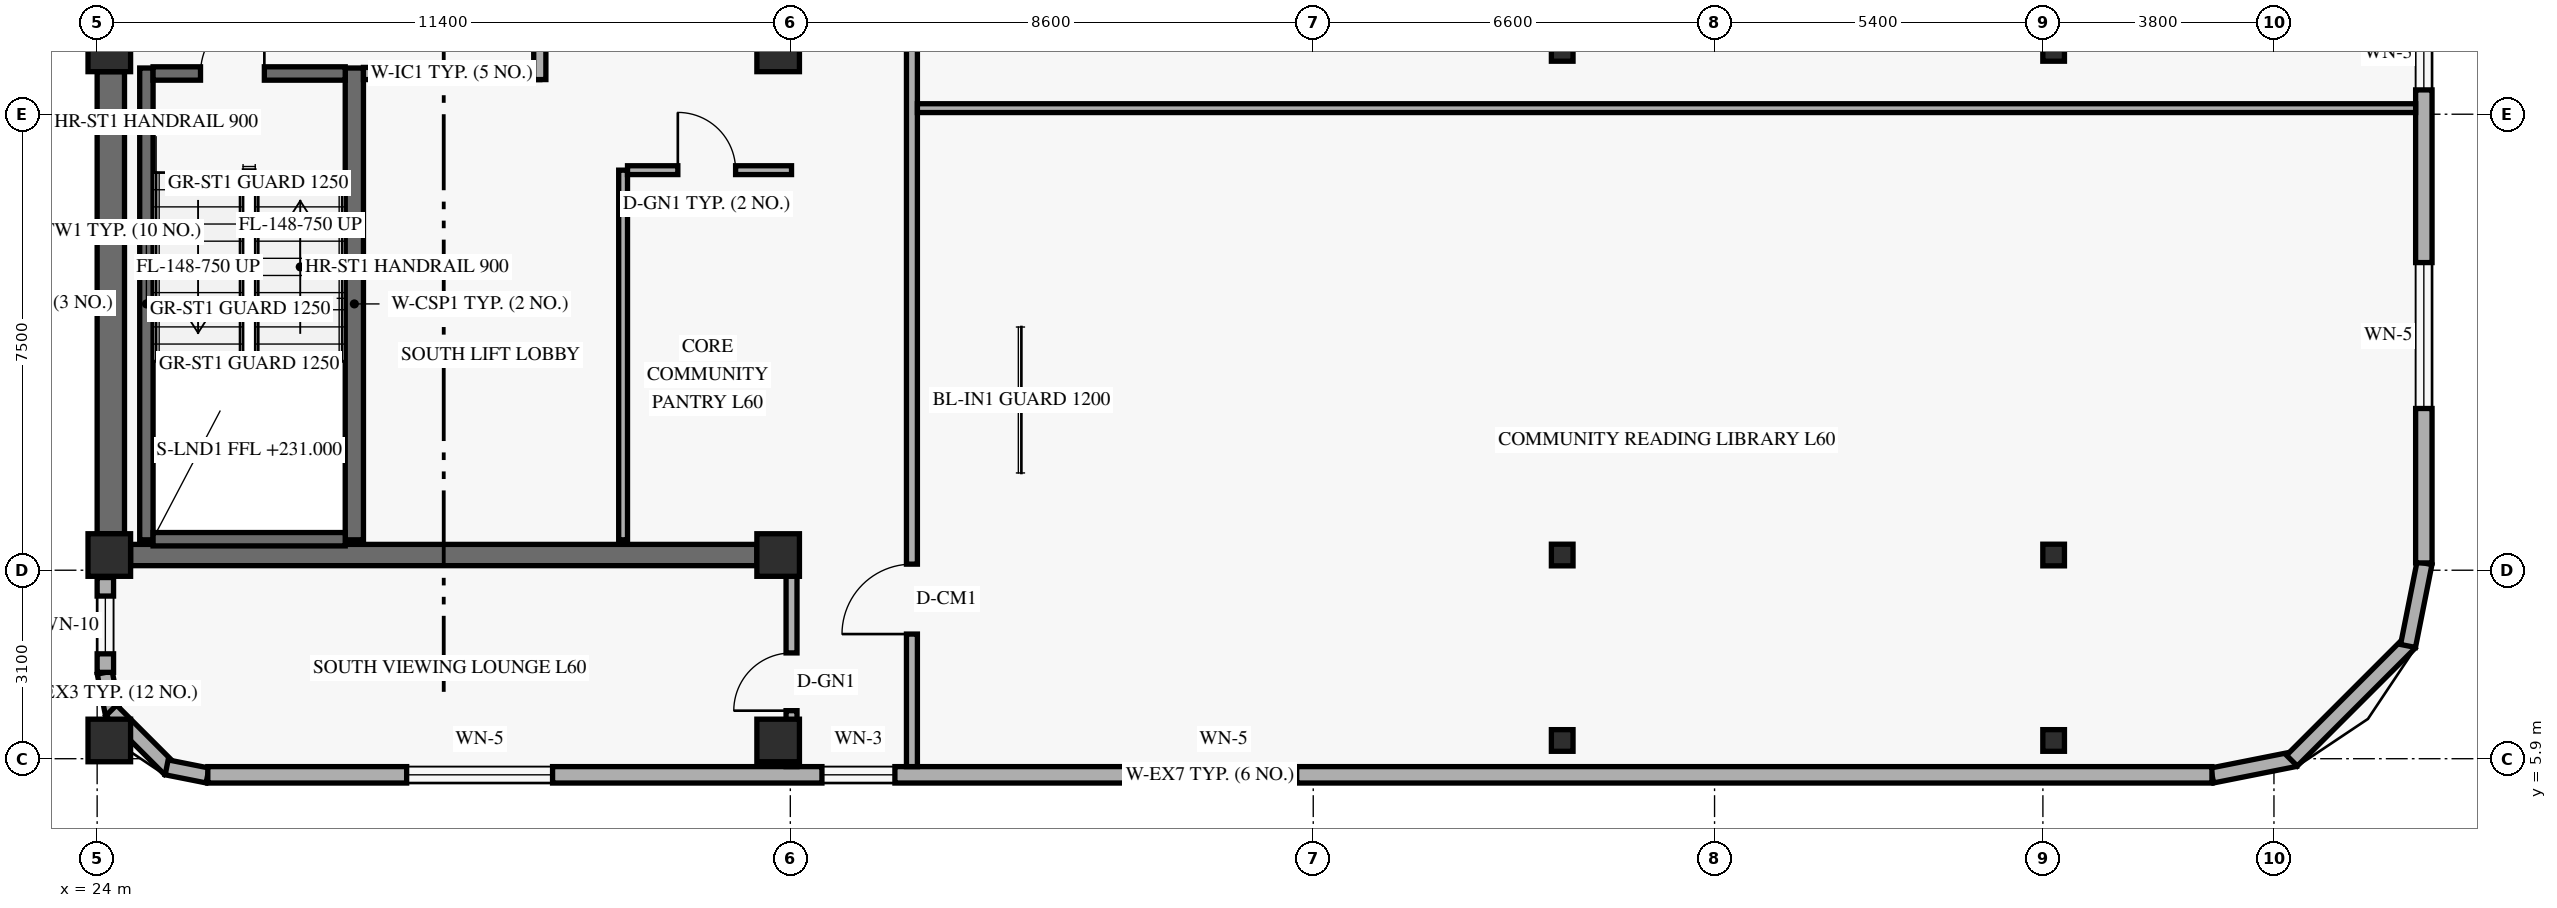
"""IFC4 building model, lengths in metres.
Left out: names, types, materials, properties, quantities, classifications, styles, units other than length and angle.
Written with IfcOpenShell. Run it as: python <this file> out.ifc"""

import sys

from ifc_helpers import new_model, si_unit, direction, frame, frame_2d, origin, origin_2d, place, context, subcontext, project, spatial, rectangle, hollow_rectangle, extrude, element, fill, save


model = new_model("IFC4")
c1 = context("Model", 3, precision=1e-05, world=origin(), true_north=direction((0.0, 1.0)))
c2 = subcontext(c1, "Body", "Model", "MODEL_VIEW")
j1 = project(units=[si_unit("LENGTHUNIT", "METRE"), si_unit("PLANEANGLEUNIT", "RADIAN")], contexts=[c1])
p1 = place(None, origin())
s1 = spatial("IfcSite", under=j1, at=p1, CompositionType="ELEMENT")
p2 = place(p1, origin())
s2 = spatial("IfcBuilding", under=s1, at=p2, CompositionType="ELEMENT")
p3 = place(p2, frame((0.0, 0.0, 231.0)))
s3 = spatial("IfcBuildingStorey", under=s2, at=p3, CompositionType="ELEMENT", Elevation=231.0)
p4 = place(p3, frame((24.225, 9.6, 0.0), z_axis=(0.0, 0.0, 1.0), x_axis=(0.0, 1.0, 0.0)))
e1 = element("IfcWall", 1, at=p4, inside=s3, PredefinedType="SHEAR", context=c2, shape_type="SweptSolid", body=[
    extrude(rectangle(XDim=7.6, YDim=0.45, at=frame_2d((3.8, 0.0))), origin(), (0.0, 0.0, 1.0), 3.421),
])
p5 = place(p3, frame((24.55, 9.25, 0.0), z_axis=(0.0, 0.0, 1.0), x_axis=(1.0, 0.0, 0.0)))
e2 = element("IfcWall", 2, at=p5, inside=s3, PredefinedType="SHEAR", context=c2, shape_type="SweptSolid", body=[
    extrude(rectangle(XDim=10.3, YDim=0.35, at=frame_2d((5.15, 0.0))), origin(), (0.0, 0.0, 1.0), 3.96),
])
p6 = place(p3, frame((24.81, 9.5, 0.0), z_axis=(0.0, 0.0, 1.0), x_axis=(0.0, 1.0, 0.0)))
e3 = element("IfcWall", 3, at=p6, inside=s3, PredefinedType="SHEAR", context=c2, shape_type="SweptSolid", body=[
    extrude(rectangle(XDim=7.76, YDim=0.22, at=frame_2d((3.88, 0.0))), origin(), (0.0, 0.0, 1.0), 3.96),
])
p7 = place(p3, frame((28.23, 9.5, 0.0), z_axis=(0.0, 0.0, 1.0), x_axis=(0.0, 1.0, 0.0)))
e4 = element("IfcWall", 4, at=p7, inside=s3, PredefinedType="SHEAR", context=c2, shape_type="SweptSolid", body=[
    extrude(rectangle(XDim=7.76, YDim=0.3, at=frame_2d((3.88, 0.0))), origin(), (0.0, 0.0, 1.0), 3.96),
])
p8 = place(p3, frame((24.92, 9.51, 0.0), z_axis=(0.0, 0.0, 1.0), x_axis=(1.0, 0.0, 0.0)))
e5 = element("IfcWall", 5, at=p8, inside=s3, PredefinedType="SHEAR", context=c2, shape_type="SweptSolid", body=[
    extrude(rectangle(XDim=3.16, YDim=0.22, at=frame_2d((1.58, 0.0))), origin(), (0.0, 0.0, 1.0), 3.96),
])
p9 = place(p3, frame((24.92, 17.17, 0.0), z_axis=(0.0, 0.0, 1.0), x_axis=(1.0, 0.0, 0.0)))
e6 = element("IfcWall", 6, at=p9, inside=s3, PredefinedType="SHEAR", context=c2, shape_type="SweptSolid", body=[
    extrude(rectangle(XDim=3.16, YDim=0.22, at=frame_2d((1.58, 0.0))), origin(), (0.0, 0.0, 1.0), 3.96),
])
p10 = place(p9, frame((0.78, 0.0, 0.0)))
e7 = element("IfcOpeningElement", 7, at=p10, cuts=e6, PredefinedType="OPENING", context=c2, shape_type="SweptSolid", body=[
    extrude(rectangle(XDim=1.05, YDim=2.15, at=frame_2d((0.525, 1.075))), frame((0.0, 0.12, 0.0), z_axis=(0.0, -1.0, 0.0), x_axis=(1.0, 0.0, 0.0)), (0.0, 0.0, 1.0), 0.24),
])
for number, where, z_axis, x_axis in (
    (8, (24.2, 6.2, 0.0), (0.0, 0.0, 1.0), (1.0, 0.0, 0.0)),
    (9, (24.2, 9.25, 0.0), (0.0, 0.0, 1.0), (1.0, 0.0, 0.0)),
    (10, (24.2, 17.55, 0.0), (0.0, 0.0, 1.0), (1.0, 0.0, 0.0)),
    (11, (35.2, 6.2, 0.0), (0.0, 0.0, 1.0), (1.0, 0.0, 0.0)),
    (12, (35.2, 9.25, 0.0), (0.0, 0.0, 1.0), (1.0, 0.0, 0.0)),
    (13, (35.2, 17.55, 0.0), (0.0, 0.0, 1.0), (1.0, 0.0, 0.0)),
):
    element("IfcColumn", number, at=place(p3, frame(where, z_axis=z_axis, x_axis=x_axis)), inside=s3, PredefinedType="COLUMN", context=c2, shape_type="SweptSolid", body=[
        extrude(rectangle(XDim=0.7, YDim=0.7, at=origin_2d()), origin(), (0.0, 0.0, 1.0), 4.2),
    ])
for number, where, z_axis, x_axis in (
    (14, (48.021, 6.2, 0.0), (0.035, 0.0, 0.999), (0.0, 1.0, 0.0)),
    (15, (48.021, 9.25, 0.0), (0.035, 0.0, 0.999), (0.0, 1.0, 0.0)),
    (16, (48.021, 17.55, 0.0), (0.035, 0.0, 0.999), (0.0, 1.0, 0.0)),
):
    element("IfcColumn", number, at=place(p3, frame(where, z_axis=z_axis, x_axis=x_axis)), inside=s3, PredefinedType="COLUMN", context=c2, shape_type="SweptSolid", body=[
        extrude(hollow_rectangle(XDim=0.356, YDim=0.356, WallThickness=0.016, at=origin_2d()), origin(), (0.0, 0.0, 1.0), 4.203),
    ])
for number, where, z_axis, x_axis in (
    (17, (56.055, 6.2, 0.0), (0.058, 0.0, 0.998), (0.0, 1.0, 0.0)),
    (18, (56.055, 9.25, 0.0), (0.058, 0.0, 0.998), (0.0, 1.0, 0.0)),
    (19, (56.055, 17.55, 0.0), (0.058, 0.0, 0.998), (0.0, 1.0, 0.0)),
):
    element("IfcColumn", number, at=place(p3, frame(where, z_axis=z_axis, x_axis=x_axis)), inside=s3, PredefinedType="COLUMN", context=c2, shape_type="SweptSolid", body=[
        extrude(hollow_rectangle(XDim=0.356, YDim=0.356, WallThickness=0.016, at=origin_2d()), origin(), (0.0, 0.0, 1.0), 4.207),
    ])
p11 = place(p3, frame((24.124, 7.316, 0.0), z_axis=(0.0, 0.0, 1.0), x_axis=(0.194952956674, -0.980812594069, 0.0)))
e20 = element("IfcWall", 20, at=p11, inside=s3, PredefinedType="SOLIDWALL", context=c2, shape_type="SweptSolid", body=[
    extrude(rectangle(XDim=0.686, YDim=0.25, at=frame_2d((0.343, 0.0))), origin(), (0.0, 0.0, 1.0), 3.403),
])
p12 = place(p3, frame((24.231, 6.694, 0.0), z_axis=(0.0, 0.0, 1.0), x_axis=(0.707106781187, -0.707106781187, 0.0)))
e21 = element("IfcWall", 21, at=p12, inside=s3, PredefinedType="SOLIDWALL", context=c2, shape_type="SweptSolid", body=[
    extrude(rectangle(XDim=1.362, YDim=0.25, at=frame_2d((0.681, 0.0))), origin(), (0.0, 0.0, 1.0), 3.403),
])
p13 = place(p3, frame((25.143, 5.758, 0.0), z_axis=(0.0, 0.0, 1.0), x_axis=(0.980812594069, -0.194952956674, 0.0)))
e22 = element("IfcWall", 22, at=p13, inside=s3, PredefinedType="SOLIDWALL", context=c2, shape_type="SweptSolid", body=[
    extrude(rectangle(XDim=0.686, YDim=0.25, at=frame_2d((0.343, 0.0))), origin(), (0.0, 0.0, 1.0), 3.96),
])
p14 = place(p3, frame((58.783, 5.624, 0.0), z_axis=(0.0, 0.0, 1.0), x_axis=(0.980809899341, 0.19496651342, 0.0)))
e23 = element("IfcWall", 23, at=p14, inside=s3, PredefinedType="SOLIDWALL", context=c2, shape_type="SweptSolid", body=[
    extrude(rectangle(XDim=1.389, YDim=0.25, at=frame_2d((0.694, 0.0))), origin(), (0.0, 0.0, 1.0), 3.96),
])
p15 = place(p3, frame((60.095, 5.868, 0.0), z_axis=(0.0, 0.0, 1.0), x_axis=(0.707106781187, 0.707106781187, 0.0)))
e24 = element("IfcWall", 24, at=p15, inside=s3, PredefinedType="SOLIDWALL", context=c2, shape_type="SweptSolid", body=[
    extrude(rectangle(XDim=2.739, YDim=0.25, at=frame_2d((1.37, 0.0))), origin(), (0.0, 0.0, 1.0), 3.96),
])
p16 = place(p3, frame((62.005, 7.754, 0.0), z_axis=(0.0, 0.0, 1.0), x_axis=(0.195135625965, 0.9807762678, 0.0)))
e25 = element("IfcWall", 25, at=p16, inside=s3, PredefinedType="SOLIDWALL", context=c2, shape_type="SweptSolid", body=[
    extrude(rectangle(XDim=1.389, YDim=0.25, at=frame_2d((0.694, 0.0))), origin(), (0.0, 0.0, 1.0), 3.96),
])
p17 = place(p3, frame((25.82, 5.635, 0.0), z_axis=(0.0, 0.0, 1.0), x_axis=(1.0, 0.0, 0.0)))
e26 = element("IfcWall", 26, at=p17, inside=s3, PredefinedType="SOLIDWALL", context=c2, shape_type="SweptSolid", body=[
    extrude(rectangle(XDim=32.96, YDim=0.27, at=frame_2d((16.48, 0.0))), origin(), (0.0, 0.0, 1.0), 3.96),
])
p18 = place(p17, frame((3.27, 0.0, 0.85)))
e27 = element("IfcOpeningElement", 27, at=p18, cuts=e26, PredefinedType="OPENING", context=c2, shape_type="SweptSolid", body=[
    extrude(rectangle(XDim=2.4, YDim=1.9, at=frame_2d((1.2, 0.95))), frame((0.0, 0.145, 0.0), z_axis=(0.0, -1.0, 0.0), x_axis=(1.0, 0.0, 0.0)), (0.0, 0.0, 1.0), 0.29),
])
p19 = place(p17, frame((10.1, 0.0, 0.85)))
e28 = element("IfcOpeningElement", 28, at=p19, cuts=e26, PredefinedType="OPENING", context=c2, shape_type="SweptSolid", body=[
    extrude(rectangle(XDim=1.2, YDim=1.5, at=frame_2d((0.6, 0.75))), frame((0.0, 0.145, 0.0), z_axis=(0.0, -1.0, 0.0), x_axis=(1.0, 0.0, 0.0)), (0.0, 0.0, 1.0), 0.29),
])
p20 = place(p17, frame((15.507, 0.0, 0.85)))
e29 = element("IfcOpeningElement", 29, at=p20, cuts=e26, PredefinedType="OPENING", context=c2, shape_type="SweptSolid", body=[
    extrude(rectangle(XDim=2.4, YDim=1.9, at=frame_2d((1.2, 0.95))), frame((0.0, 0.145, 0.0), z_axis=(0.0, -1.0, 0.0), x_axis=(1.0, 0.0, 0.0)), (0.0, 0.0, 1.0), 0.29),
])
p21 = place(p3, frame((62.265, 9.12, 0.0), z_axis=(0.0, 0.0, 1.0), x_axis=(0.0, 1.0, 0.0)))
e30 = element("IfcWall", 30, at=p21, inside=s3, PredefinedType="SOLIDWALL", context=c2, shape_type="SweptSolid", body=[
    extrude(rectangle(XDim=9.28, YDim=0.27, at=frame_2d((4.64, 0.0))), origin(), (0.0, 0.0, 1.0), 3.96),
])
p22 = place(p21, frame((2.54, 0.0, 0.85)))
e31 = element("IfcOpeningElement", 31, at=p22, cuts=e30, PredefinedType="OPENING", context=c2, shape_type="SweptSolid", body=[
    extrude(rectangle(XDim=2.4, YDim=1.9, at=frame_2d((1.2, 0.95))), frame((0.0, 0.145, 0.0), z_axis=(0.0, -1.0, 0.0), x_axis=(1.0, 0.0, 0.0)), (0.0, 0.0, 1.0), 0.29),
])
p23 = place(p21, frame((7.78, 0.0, 0.85)))
e32 = element("IfcOpeningElement", 32, at=p23, cuts=e30, PredefinedType="OPENING", context=c2, shape_type="SweptSolid", body=[
    extrude(rectangle(XDim=1.2, YDim=1.5, at=frame_2d((0.6, 0.75))), frame((0.0, 0.145, 0.0), z_axis=(0.0, -1.0, 0.0), x_axis=(1.0, 0.0, 0.0)), (0.0, 0.0, 1.0), 0.29),
])
p24 = place(p3, frame((24.135, 7.32, 0.0), z_axis=(0.0, 0.0, 1.0), x_axis=(0.0, 1.0, 0.0)))
e33 = element("IfcWall", 33, at=p24, inside=s3, PredefinedType="SOLIDWALL", context=c2, shape_type="SweptSolid", body=[
    extrude(rectangle(XDim=1.56, YDim=0.27, at=frame_2d((0.78, 0.0))), origin(), (0.0, 0.0, 1.0), 3.403),
])
p25 = place(p24, frame((0.305, 0.0, 0.85)))
e34 = element("IfcOpeningElement", 34, at=p25, cuts=e33, PredefinedType="OPENING", context=c2, shape_type="SweptSolid", body=[
    extrude(rectangle(XDim=0.95, YDim=1.5, at=frame_2d((0.475, 0.75))), frame((0.0, 0.145, 0.0), z_axis=(0.0, -1.0, 0.0), x_axis=(1.0, 0.0, 0.0)), (0.0, 0.0, 1.0), 0.29),
])
p26 = place(p3, frame((28.38, 17.17, 0.0), z_axis=(0.0, 0.0, 1.0), x_axis=(1.0, 0.0, 0.0)))
e35 = element("IfcWall", 35, at=p26, inside=s3, PredefinedType="STANDARD", context=c2, shape_type="SweptSolid", body=[
    extrude(rectangle(XDim=2.9, YDim=0.2, at=frame_2d((1.45, 0.0))), origin(), (0.0, 0.0, 1.0), 3.96),
])
p27 = place(p3, frame((31.28, 17.07, 0.0), z_axis=(0.0, 0.0, 1.0), x_axis=(0.0, 1.0, 0.0)))
e36 = element("IfcWall", 36, at=p27, inside=s3, PredefinedType="STANDARD", context=c2, shape_type="SweptSolid", body=[
    extrude(rectangle(XDim=3.92, YDim=0.2, at=frame_2d((1.96, 0.0))), origin(), (0.0, 0.0, 1.0), 3.403),
])
p28 = place(p27, frame((1.35, 0.0, 0.0)))
e37 = element("IfcOpeningElement", 37, at=p28, cuts=e36, PredefinedType="OPENING", context=c2, shape_type="SweptSolid", body=[
    extrude(rectangle(XDim=1.2, YDim=2.15, at=frame_2d((0.6, 1.075))), frame((0.0, 0.11, 0.0), z_axis=(0.0, -1.0, 0.0), x_axis=(1.0, 0.0, 0.0)), (0.0, 0.0, 1.0), 0.22),
])
p29 = place(p3, frame((37.4, 5.77, 0.0), z_axis=(0.0, 0.0, 1.0), x_axis=(0.0, 1.0, 0.0)))
e38 = element("IfcWall", 38, at=p29, inside=s3, PredefinedType="STANDARD", context=c2, shape_type="SweptSolid", body=[
    extrude(rectangle(XDim=36.46, YDim=0.18, at=frame_2d((18.23, 0.0))), origin(), (0.0, 0.0, 1.0), 3.403),
])
p30 = place(p29, frame((26.32, 0.0, 0.0)))
e39 = element("IfcOpeningElement", 39, at=p30, cuts=e38, PredefinedType="OPENING", context=c2, shape_type="SweptSolid", body=[
    extrude(rectangle(XDim=0.92, YDim=2.14, at=frame_2d((0.46, 1.07))), frame((0.0, 0.1, 0.0), z_axis=(0.0, -1.0, 0.0), x_axis=(1.0, 0.0, 0.0)), (0.0, 0.0, 1.0), 0.2),
])
p31 = place(p29, frame((31.95, 0.0, 0.0)))
e40 = element("IfcOpeningElement", 40, at=p31, cuts=e38, PredefinedType="OPENING", context=c2, shape_type="SweptSolid", body=[
    extrude(rectangle(XDim=0.95, YDim=2.14, at=frame_2d((0.475, 1.07))), frame((0.0, 0.1, 0.0), z_axis=(0.0, -1.0, 0.0), x_axis=(1.0, 0.0, 0.0)), (0.0, 0.0, 1.0), 0.2),
])
p32 = place(p29, frame((2.18, 0.0, 0.0)))
e41 = element("IfcOpeningElement", 41, at=p32, cuts=e38, PredefinedType="OPENING", context=c2, shape_type="SweptSolid", body=[
    extrude(rectangle(XDim=1.15, YDim=2.15, at=frame_2d((0.575, 1.075))), frame((0.0, 0.1, 0.0), z_axis=(0.0, -1.0, 0.0), x_axis=(1.0, 0.0, 0.0)), (0.0, 0.0, 1.0), 0.2),
])
p33 = place(p29, frame((22.63, 0.0, 0.0)))
e42 = element("IfcOpeningElement", 42, at=p33, cuts=e38, PredefinedType="OPENING", context=c2, shape_type="SweptSolid", body=[
    extrude(rectangle(XDim=1.15, YDim=2.15, at=frame_2d((0.575, 1.075))), frame((0.0, 0.1, 0.0), z_axis=(0.0, -1.0, 0.0), x_axis=(1.0, 0.0, 0.0)), (0.0, 0.0, 1.0), 0.2),
])
p34 = place(p3, frame((35.42, 5.77, 0.0), z_axis=(0.0, 0.0, 1.0), x_axis=(0.0, 1.0, 0.0)))
e43 = element("IfcWall", 43, at=p34, inside=s3, PredefinedType="STANDARD", context=c2, shape_type="SweptSolid", body=[
    extrude(rectangle(XDim=3.48, YDim=0.18, at=frame_2d((1.74, 0.0))), origin(), (0.0, 0.0, 1.0), 3.403),
])
p35 = place(p34, frame((0.92, 0.0, 0.0)))
e44 = element("IfcOpeningElement", 44, at=p35, cuts=e43, PredefinedType="OPENING", context=c2, shape_type="SweptSolid", body=[
    extrude(rectangle(XDim=0.95, YDim=2.15, at=frame_2d((0.475, 1.075))), frame((0.0, 0.1, 0.0), z_axis=(0.0, -1.0, 0.0), x_axis=(1.0, 0.0, 0.0)), (0.0, 0.0, 1.0), 0.2),
])
p36 = place(p3, frame((37.49, 16.6, 0.0), z_axis=(0.0, 0.0, 1.0), x_axis=(1.0, 0.0, 0.0)))
e45 = element("IfcWall", 45, at=p36, inside=s3, PredefinedType="PARTITIONING", context=c2, shape_type="SweptSolid", body=[
    extrude(rectangle(XDim=24.64, YDim=0.145, at=frame_2d((12.32, 0.0))), origin(), (0.0, 0.0, 1.0), 3.403),
])
p37 = place(p3, frame((32.65, 9.5, 0.0), z_axis=(0.0, 0.0, 1.0), x_axis=(0.0, 1.0, 0.0)))
e46 = element("IfcWall", 46, at=p37, inside=s3, PredefinedType="PARTITIONING", context=c2, shape_type="SweptSolid", body=[
    extrude(rectangle(XDim=6.08, YDim=0.145, at=frame_2d((3.04, 0.0))), origin(), (0.0, 0.0, 1.0), 3.96),
])
p38 = place(p3, frame((32.722, 15.58, 0.0), z_axis=(0.0, 0.0, 1.0), x_axis=(1.0, 0.0, 0.0)))
e47 = element("IfcWall", 47, at=p38, inside=s3, PredefinedType="PARTITIONING", context=c2, shape_type="SweptSolid", body=[
    extrude(rectangle(XDim=2.698, YDim=0.145, at=frame_2d((1.349, 0.0))), origin(), (0.0, 0.0, 1.0), 3.403),
])
p39 = place(p38, frame((0.827, 0.0, 0.0)))
e48 = element("IfcOpeningElement", 48, at=p39, cuts=e47, PredefinedType="OPENING", context=c2, shape_type="SweptSolid", body=[
    extrude(rectangle(XDim=0.95, YDim=2.15, at=frame_2d((0.475, 1.075))), frame((0.0, 0.083, 0.0), z_axis=(0.0, -1.0, 0.0), x_axis=(1.0, 0.0, 0.0)), (0.0, 0.0, 1.0), 0.165),
])
p40 = place(p18, origin())
e49 = element("IfcWindow", 49, at=p40, inside=s3, PartitioningType="SINGLE_PANEL", PredefinedType="WINDOW", context=c2, shape_type="SweptSolid", body=[
    extrude(rectangle(XDim=2.4, YDim=1.9, at=frame_2d((1.2, 0.95))), frame((0.0, 0.03, 0.0), z_axis=(0.0, -1.0, 0.0), x_axis=(1.0, 0.0, 0.0)), (0.0, 0.0, 1.0), 0.06),
])
fill(e27, e49)
p41 = place(p19, origin())
e50 = element("IfcWindow", 50, at=p41, inside=s3, PartitioningType="SINGLE_PANEL", PredefinedType="WINDOW", context=c2, shape_type="SweptSolid", body=[
    extrude(rectangle(XDim=1.2, YDim=1.5, at=frame_2d((0.6, 0.75))), frame((0.0, 0.03, 0.0), z_axis=(0.0, -1.0, 0.0), x_axis=(1.0, 0.0, 0.0)), (0.0, 0.0, 1.0), 0.06),
])
fill(e28, e50)
p42 = place(p20, origin())
e51 = element("IfcWindow", 51, at=p42, inside=s3, PartitioningType="SINGLE_PANEL", PredefinedType="WINDOW", context=c2, shape_type="SweptSolid", body=[
    extrude(rectangle(XDim=2.4, YDim=1.9, at=frame_2d((1.2, 0.95))), frame((0.0, 0.03, 0.0), z_axis=(0.0, -1.0, 0.0), x_axis=(1.0, 0.0, 0.0)), (0.0, 0.0, 1.0), 0.06),
])
fill(e29, e51)
p43 = place(p22, origin())
e52 = element("IfcWindow", 52, at=p43, inside=s3, PartitioningType="SINGLE_PANEL", PredefinedType="WINDOW", context=c2, shape_type="SweptSolid", body=[
    extrude(rectangle(XDim=2.4, YDim=1.9, at=frame_2d((1.2, 0.95))), frame((0.0, 0.03, 0.0), z_axis=(0.0, -1.0, 0.0), x_axis=(1.0, 0.0, 0.0)), (0.0, 0.0, 1.0), 0.06),
])
fill(e31, e52)
p44 = place(p23, origin())
e53 = element("IfcWindow", 53, at=p44, inside=s3, PartitioningType="SINGLE_PANEL", PredefinedType="WINDOW", context=c2, shape_type="SweptSolid", body=[
    extrude(rectangle(XDim=1.2, YDim=1.5, at=frame_2d((0.6, 0.75))), frame((0.0, 0.03, 0.0), z_axis=(0.0, -1.0, 0.0), x_axis=(1.0, 0.0, 0.0)), (0.0, 0.0, 1.0), 0.06),
])
fill(e32, e53)
p45 = place(p25, origin())
e54 = element("IfcWindow", 54, at=p45, inside=s3, PartitioningType="SINGLE_PANEL", PredefinedType="WINDOW", context=c2, shape_type="SweptSolid", body=[
    extrude(rectangle(XDim=0.95, YDim=1.5, at=frame_2d((0.475, 0.75))), frame((0.0, 0.03, 0.0), z_axis=(0.0, -1.0, 0.0), x_axis=(1.0, 0.0, 0.0)), (0.0, 0.0, 1.0), 0.06),
])
fill(e34, e54)
p46 = place(p10, frame((1.05, 0.0, 0.0), z_axis=(0.0, 0.0, 1.0), x_axis=(-1.0, 0.0, 0.0)))
e55 = element("IfcDoor", 55, at=p46, inside=s3, OperationType="SINGLE_SWING_LEFT", PredefinedType="DOOR", context=c2, shape_type="SweptSolid", body=[
    extrude(rectangle(XDim=1.05, YDim=2.15, at=frame_2d((0.525, 1.075))), frame((0.0, 0.025, 0.0), z_axis=(0.0, -1.0, 0.0), x_axis=(1.0, 0.0, 0.0)), (0.0, 0.0, 1.0), 0.05),
])
fill(e7, e55)
p47 = place(p39, origin())
e56 = element("IfcDoor", 56, at=p47, inside=s3, OperationType="SINGLE_SWING_LEFT", PredefinedType="DOOR", context=c2, shape_type="SweptSolid", body=[
    extrude(rectangle(XDim=0.95, YDim=2.15, at=frame_2d((0.475, 1.075))), frame((0.0, 0.025, 0.0), z_axis=(0.0, -1.0, 0.0), x_axis=(1.0, 0.0, 0.0)), (0.0, 0.0, 1.0), 0.05),
])
fill(e48, e56)
p48 = place(p32, origin())
e57 = element("IfcDoor", 57, at=p48, inside=s3, OperationType="SINGLE_SWING_LEFT", PredefinedType="DOOR", context=c2, shape_type="SweptSolid", body=[
    extrude(rectangle(XDim=1.15, YDim=2.15, at=frame_2d((0.575, 1.075))), frame((0.0, 0.025, 0.0), z_axis=(0.0, -1.0, 0.0), x_axis=(1.0, 0.0, 0.0)), (0.0, 0.0, 1.0), 0.05),
])
fill(e41, e57)
p49 = place(p35, origin())
e58 = element("IfcDoor", 58, at=p49, inside=s3, OperationType="SINGLE_SWING_LEFT", PredefinedType="DOOR", context=c2, shape_type="SweptSolid", body=[
    extrude(rectangle(XDim=0.95, YDim=2.15, at=frame_2d((0.475, 1.075))), frame((0.0, 0.025, 0.0), z_axis=(0.0, -1.0, 0.0), x_axis=(1.0, 0.0, 0.0)), (0.0, 0.0, 1.0), 0.05),
])
fill(e44, e58)
save(model, sys.argv[1])
